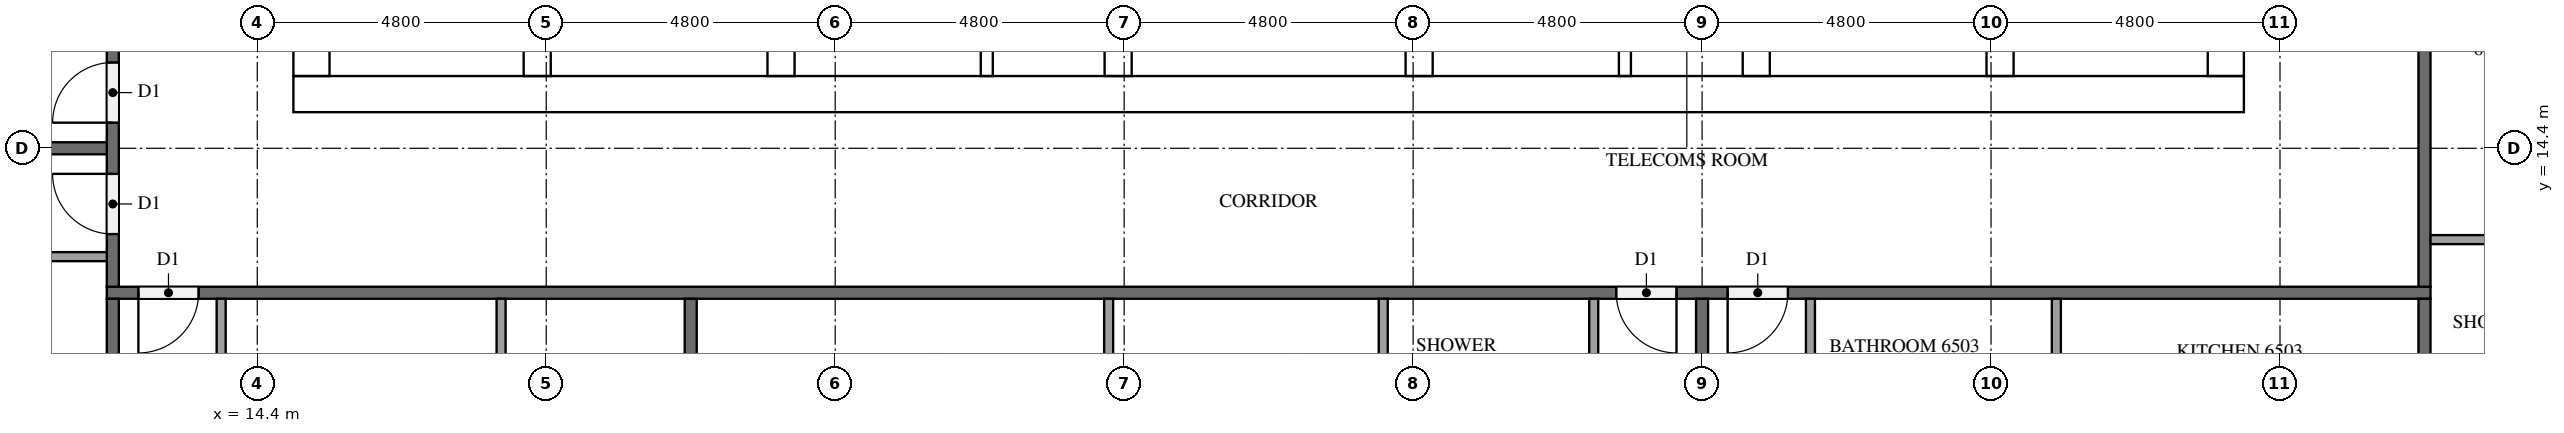
"""IFC4 building model, lengths in metres.
Left out: names, types, materials, properties, quantities, classifications, styles, units other than length and angle.
Written with IfcOpenShell. Run it as: python <this file> out.ifc"""

import sys

from ifc_helpers import new_model, si_unit, direction, frame, frame_2d, origin, place, context, subcontext, project, spatial, rectangle, extrude, element, fill, save


model = new_model("IFC4")
c1 = context("Model", 3, precision=1e-05, world=origin(), true_north=direction((0.0, 1.0)))
c2 = subcontext(c1, "Body", "Model", "MODEL_VIEW")
j1 = project(units=[si_unit("LENGTHUNIT", "METRE"), si_unit("PLANEANGLEUNIT", "RADIAN")], contexts=[c1])
p1 = place(None, origin())
s1 = spatial("IfcSite", under=j1, at=p1, CompositionType="ELEMENT")
p2 = place(p1, origin())
s2 = spatial("IfcBuilding", under=s1, at=p2, CompositionType="ELEMENT")
p3 = place(p2, frame((0.0, 0.0, 249.2)))
s3 = spatial("IfcBuildingStorey", under=s2, at=p3, CompositionType="ELEMENT", Elevation=249.2)
p4 = place(p3, frame((15.0, 15.3, 0.0), z_axis=(0.0, 0.0, 1.0), x_axis=(1.0, 0.0, 0.0)))
e1 = element("IfcWall", 1, at=p4, inside=s3, PredefinedType="SHEAR", context=c2, shape_type="SweptSolid", body=[
    extrude(rectangle(XDim=32.4, YDim=0.6, at=frame_2d((16.2, 0.0))), origin(), (0.0, 0.0, 1.0), 3.2),
])
p5 = place(p4, frame((15.3, 0.0, 0.0)))
e2 = element("IfcOpeningElement", 2, at=p5, cuts=e1, PredefinedType="OPENING", context=c2, shape_type="SweptSolid", body=[
    extrude(rectangle(XDim=1.8, YDim=2.1, at=frame_2d((0.9, 1.05))), frame((0.0, 0.31, 0.0), z_axis=(0.0, -1.0, 0.0), x_axis=(1.0, 0.0, 0.0)), (0.0, 0.0, 1.0), 0.62),
])
p6 = place(p3, frame((15.3, 15.6, 0.0), z_axis=(0.0, 0.0, 1.0), x_axis=(0.0, 1.0, 0.0)))
e3 = element("IfcWall", 3, at=p6, inside=s3, PredefinedType="SHEAR", context=c2, shape_type="SweptSolid", body=[
    extrude(rectangle(XDim=21.6, YDim=0.6, at=frame_2d((10.8, 0.0))), origin(), (0.0, 0.0, 1.0), 3.2),
])
p7 = place(p6, frame((5.16, 0.0, 0.0)))
e4 = element("IfcOpeningElement", 4, at=p7, cuts=e3, PredefinedType="OPENING", context=c2, shape_type="SweptSolid", body=[
    extrude(rectangle(XDim=1.2, YDim=2.1, at=frame_2d((0.6, 1.05))), frame((0.0, 0.31, 0.0), z_axis=(0.0, -1.0, 0.0), x_axis=(1.0, 0.0, 0.0)), (0.0, 0.0, 1.0), 0.62),
])
p8 = place(p3, frame((47.1, 15.6, 0.0), z_axis=(0.0, 0.0, 1.0), x_axis=(0.0, 1.0, 0.0)))
e5 = element("IfcWall", 5, at=p8, inside=s3, PredefinedType="SHEAR", context=c2, shape_type="SweptSolid", body=[
    extrude(rectangle(XDim=21.6, YDim=0.6, at=frame_2d((10.8, 0.0))), origin(), (0.0, 0.0, 1.0), 3.2),
])
p9 = place(p8, frame((10.5, 0.0, 0.0)))
e6 = element("IfcOpeningElement", 6, at=p9, cuts=e5, PredefinedType="OPENING", context=c2, shape_type="SweptSolid", body=[
    extrude(rectangle(XDim=1.2, YDim=2.1, at=frame_2d((0.6, 1.05))), frame((0.0, 0.31, 0.0), z_axis=(0.0, -1.0, 0.0), x_axis=(1.0, 0.0, 0.0)), (0.0, 0.0, 1.0), 0.62),
])
p10 = place(p3, frame((19.05, 15.6, 0.0), z_axis=(0.0, 0.0, 1.0), x_axis=(0.0, 1.0, 0.0)))
e7 = element("IfcWall", 7, at=p10, inside=s3, PredefinedType="SHEAR", context=c2, shape_type="SweptSolid", body=[
    extrude(rectangle(XDim=15.425, YDim=0.45, at=frame_2d((7.712, 0.0))), origin(), (0.0, 0.0, 1.0), 3.2),
])
p11 = place(p10, frame((9.85, 0.0, 0.0)))
e8 = element("IfcOpeningElement", 8, at=p11, cuts=e7, PredefinedType="OPENING", context=c2, shape_type="SweptSolid", body=[
    extrude(rectangle(XDim=1.1, YDim=2.1, at=frame_2d((0.55, 1.05))), frame((0.0, 0.235, 0.0), z_axis=(0.0, -1.0, 0.0), x_axis=(1.0, 0.0, 0.0)), (0.0, 0.0, 1.0), 0.47),
])
p12 = place(p10, frame((13.35, 0.0, 0.0)))
e9 = element("IfcOpeningElement", 9, at=p12, cuts=e7, PredefinedType="OPENING", context=c2, shape_type="SweptSolid", body=[
    extrude(rectangle(XDim=1.1, YDim=2.1, at=frame_2d((0.55, 1.05))), frame((0.0, 0.235, 0.0), z_axis=(0.0, -1.0, 0.0), x_axis=(1.0, 0.0, 0.0)), (0.0, 0.0, 1.0), 0.47),
])
p13 = place(p10, frame((0.6, 0.0, 0.0)))
e10 = element("IfcOpeningElement", 10, at=p13, cuts=e7, PredefinedType="OPENING", context=c2, shape_type="SweptSolid", body=[
    extrude(rectangle(XDim=1.2, YDim=2.1, at=frame_2d((0.6, 1.05))), frame((0.0, 0.235, 0.0), z_axis=(0.0, -1.0, 0.0), x_axis=(1.0, 0.0, 0.0)), (0.0, 0.0, 1.0), 0.47),
])
p14 = place(p3, frame((23.1, 15.6, 0.0), z_axis=(0.0, 0.0, 1.0), x_axis=(0.0, 1.0, 0.0)))
e11 = element("IfcWall", 11, at=p14, inside=s3, PredefinedType="SHEAR", context=c2, shape_type="SweptSolid", body=[
    extrude(rectangle(XDim=21.6, YDim=0.45, at=frame_2d((10.8, 0.0))), origin(), (0.0, 0.0, 1.0), 3.2),
])
p15 = place(p3, frame((39.3, 15.6, 0.0), z_axis=(0.0, 0.0, 1.0), x_axis=(0.0, 1.0, 0.0)))
e12 = element("IfcWall", 12, at=p15, inside=s3, PredefinedType="SHEAR", context=c2, shape_type="SweptSolid", body=[
    extrude(rectangle(XDim=8.65, YDim=0.45, at=frame_2d((4.325, 0.0))), origin(), (0.0, 0.0, 1.0), 3.2),
])
p16 = place(p3, frame((43.35, 15.6, 0.0), z_axis=(0.0, 0.0, 1.0), x_axis=(0.0, 1.0, 0.0)))
e13 = element("IfcWall", 13, at=p16, inside=s3, PredefinedType="SHEAR", context=c2, shape_type="SweptSolid", body=[
    extrude(rectangle(XDim=8.65, YDim=0.45, at=frame_2d((4.325, 0.0))), origin(), (0.0, 0.0, 1.0), 3.2),
])
p17 = place(p16, frame((0.6, 0.0, 0.0)))
e14 = element("IfcOpeningElement", 14, at=p17, cuts=e13, PredefinedType="OPENING", context=c2, shape_type="SweptSolid", body=[
    extrude(rectangle(XDim=1.2, YDim=2.1, at=frame_2d((0.6, 1.05))), frame((0.0, 0.235, 0.0), z_axis=(0.0, -1.0, 0.0), x_axis=(1.0, 0.0, 0.0)), (0.0, 0.0, 1.0), 0.47),
])
for number, where, z_axis, x_axis in (
    (15, (28.7, 15.6, 0.0), (0.0, 0.0, 1.0), (0.0, 1.0, 0.0)),
    (16, (33.7, 15.6, 0.0), (0.0, 0.0, 1.0), (0.0, 1.0, 0.0)),
):
    element("IfcWall", number, at=place(p3, frame(where, z_axis=z_axis, x_axis=x_axis)), inside=s3, PredefinedType="SHEAR", context=c2, shape_type="SweptSolid", body=[
        extrude(rectangle(XDim=2.925, YDim=0.45, at=frame_2d((1.462, 0.0))), origin(), (0.0, 0.0, 1.0), 3.2),
    ])
for number, where, z_axis, x_axis in (
    (17, (26.518, 15.6, 0.0), (0.0, 0.0, 1.0), (0.0, 1.0, 0.0)),
    (18, (37.118, 15.6, 0.0), (0.0, 0.0, 1.0), (0.0, 1.0, 0.0)),
):
    element("IfcWall", number, at=place(p3, frame(where, z_axis=z_axis, x_axis=x_axis)), inside=s3, PredefinedType="PARTITIONING", context=c2, shape_type="SweptSolid", body=[
        extrude(rectangle(XDim=2.925, YDim=0.2, at=frame_2d((1.462, 0.0))), origin(), (0.0, 0.0, 1.0), 3.2),
    ])
p18 = place(p3, frame((50.5, 12.0, 0.0), z_axis=(0.0, 0.0, 1.0), x_axis=(-1.0, 0.0, 0.0)))
e19 = element("IfcWall", 19, at=p18, inside=s3, PredefinedType="PARTITIONING", context=c2, shape_type="SweptSolid", body=[
    extrude(rectangle(XDim=38.6, YDim=0.2, at=frame_2d((19.3, 0.0))), origin(), (0.0, 0.0, 1.0), 3.2),
])
p19 = place(p18, frame((37.075, 0.0, 0.0)))
e20 = element("IfcOpeningElement", 20, at=p19, cuts=e19, PredefinedType="OPENING", context=c2, shape_type="SweptSolid", body=[
    extrude(rectangle(XDim=1.0, YDim=2.1, at=frame_2d((0.5, 1.05))), frame((0.0, 0.11, 0.0), z_axis=(0.0, -1.0, 0.0), x_axis=(1.0, 0.0, 0.0)), (0.0, 0.0, 1.0), 0.22),
])
p20 = place(p18, frame((12.525, 0.0, 0.0)))
e21 = element("IfcOpeningElement", 21, at=p20, cuts=e19, PredefinedType="OPENING", context=c2, shape_type="SweptSolid", body=[
    extrude(rectangle(XDim=1.0, YDim=2.1, at=frame_2d((0.5, 1.05))), frame((0.0, 0.11, 0.0), z_axis=(0.0, -1.0, 0.0), x_axis=(1.0, 0.0, 0.0)), (0.0, 0.0, 1.0), 0.22),
])
p21 = place(p18, frame((10.675, 0.0, 0.0)))
e22 = element("IfcOpeningElement", 22, at=p21, cuts=e19, PredefinedType="OPENING", context=c2, shape_type="SweptSolid", body=[
    extrude(rectangle(XDim=1.0, YDim=2.1, at=frame_2d((0.5, 1.05))), frame((0.0, 0.11, 0.0), z_axis=(0.0, -1.0, 0.0), x_axis=(1.0, 0.0, 0.0)), (0.0, 0.0, 1.0), 0.22),
])
p22 = place(p3, frame((50.4, 40.7, 0.0), z_axis=(0.0, 0.0, 1.0), x_axis=(0.0, -1.0, 0.0)))
e23 = element("IfcWall", 23, at=p22, inside=s3, PredefinedType="PARTITIONING", context=c2, shape_type="SweptSolid", body=[
    extrude(rectangle(XDim=28.6, YDim=0.2, at=frame_2d((14.3, 0.0))), origin(), (0.0, 0.0, 1.0), 3.2),
])
p23 = place(p22, frame((19.525, 0.0, 0.0)))
e24 = element("IfcOpeningElement", 24, at=p23, cuts=e23, PredefinedType="OPENING", context=c2, shape_type="SweptSolid", body=[
    extrude(rectangle(XDim=1.0, YDim=2.1, at=frame_2d((0.5, 1.05))), frame((0.0, 0.11, 0.0), z_axis=(0.0, -1.0, 0.0), x_axis=(1.0, 0.0, 0.0)), (0.0, 0.0, 1.0), 0.22),
])
p24 = place(p22, frame((17.675, 0.0, 0.0)))
e25 = element("IfcOpeningElement", 25, at=p24, cuts=e23, PredefinedType="OPENING", context=c2, shape_type="SweptSolid", body=[
    extrude(rectangle(XDim=1.0, YDim=2.1, at=frame_2d((0.5, 1.05))), frame((0.0, 0.11, 0.0), z_axis=(0.0, -1.0, 0.0), x_axis=(1.0, 0.0, 0.0)), (0.0, 0.0, 1.0), 0.22),
])
p25 = place(p22, frame((0.325, 0.0, 0.0)))
e26 = element("IfcOpeningElement", 26, at=p25, cuts=e23, PredefinedType="OPENING", context=c2, shape_type="SweptSolid", body=[
    extrude(rectangle(XDim=1.0, YDim=2.1, at=frame_2d((0.5, 1.05))), frame((0.0, 0.11, 0.0), z_axis=(0.0, -1.0, 0.0), x_axis=(1.0, 0.0, 0.0)), (0.0, 0.0, 1.0), 0.22),
])
p26 = place(p3, frame((12.0, 12.1, 0.0), z_axis=(0.0, 0.0, 1.0), x_axis=(0.0, 1.0, 0.0)))
e27 = element("IfcWall", 27, at=p26, inside=s3, PredefinedType="PARTITIONING", context=c2, shape_type="SweptSolid", body=[
    extrude(rectangle(XDim=28.6, YDim=0.2, at=frame_2d((14.3, 0.0))), origin(), (0.0, 0.0, 1.0), 3.2),
])
p27 = place(p26, frame((26.725, 0.0, 0.0)))
e28 = element("IfcOpeningElement", 28, at=p27, cuts=e27, PredefinedType="OPENING", context=c2, shape_type="SweptSolid", body=[
    extrude(rectangle(XDim=1.0, YDim=2.1, at=frame_2d((0.5, 1.05))), frame((0.0, 0.11, 0.0), z_axis=(0.0, -1.0, 0.0), x_axis=(1.0, 0.0, 0.0)), (0.0, 0.0, 1.0), 0.22),
])
p28 = place(p26, frame((24.875, 0.0, 0.0)))
e29 = element("IfcOpeningElement", 29, at=p28, cuts=e27, PredefinedType="OPENING", context=c2, shape_type="SweptSolid", body=[
    extrude(rectangle(XDim=1.0, YDim=2.1, at=frame_2d((0.5, 1.05))), frame((0.0, 0.11, 0.0), z_axis=(0.0, -1.0, 0.0), x_axis=(1.0, 0.0, 0.0)), (0.0, 0.0, 1.0), 0.22),
])
p29 = place(p26, frame((17.675, 0.0, 0.0)))
e30 = element("IfcOpeningElement", 30, at=p29, cuts=e27, PredefinedType="OPENING", context=c2, shape_type="SweptSolid", body=[
    extrude(rectangle(XDim=1.0, YDim=2.1, at=frame_2d((0.5, 1.05))), frame((0.0, 0.11, 0.0), z_axis=(0.0, -1.0, 0.0), x_axis=(1.0, 0.0, 0.0)), (0.0, 0.0, 1.0), 0.22),
])
p30 = place(p26, frame((2.725, 0.0, 0.0)))
e31 = element("IfcOpeningElement", 31, at=p30, cuts=e27, PredefinedType="OPENING", context=c2, shape_type="SweptSolid", body=[
    extrude(rectangle(XDim=1.0, YDim=2.1, at=frame_2d((0.5, 1.05))), frame((0.0, 0.11, 0.0), z_axis=(0.0, -1.0, 0.0), x_axis=(1.0, 0.0, 0.0)), (0.0, 0.0, 1.0), 0.22),
])
p31 = place(p26, frame((0.875, 0.0, 0.0)))
e32 = element("IfcOpeningElement", 32, at=p31, cuts=e27, PredefinedType="OPENING", context=c2, shape_type="SweptSolid", body=[
    extrude(rectangle(XDim=1.0, YDim=2.1, at=frame_2d((0.5, 1.05))), frame((0.0, 0.11, 0.0), z_axis=(0.0, -1.0, 0.0), x_axis=(1.0, 0.0, 0.0)), (0.0, 0.0, 1.0), 0.22),
])
for number, where, z_axis, x_axis in (
    (33, (21.6, 11.9, 0.0), (0.0, 0.0, 1.0), (0.0, -1.0, 0.0)),
    (34, (12.0, 4.9, 0.0), (0.0, 0.0, 1.0), (0.0, 1.0, 0.0)),
    (35, (38.4, 11.9, 0.0), (0.0, 0.0, 1.0), (0.0, -1.0, 0.0)),
    (36, (50.4, 11.9, 0.0), (0.0, 0.0, 1.0), (0.0, -1.0, 0.0)),
):
    element("IfcWall", number, at=place(p3, frame(where, z_axis=z_axis, x_axis=x_axis)), inside=s3, PredefinedType="PARTITIONING", context=c2, shape_type="SweptSolid", body=[
        extrude(rectangle(XDim=7.0, YDim=0.2, at=frame_2d((3.5, 0.0))), origin(), (0.0, 0.0, 1.0), 3.2),
    ])
p32 = place(p3, frame((0.1, 14.4, 0.0), z_axis=(0.0, 0.0, 1.0), x_axis=(1.0, 0.0, 0.0)))
e37 = element("IfcWall", 37, at=p32, inside=s3, PredefinedType="PARTITIONING", context=c2, shape_type="SweptSolid", body=[
    extrude(rectangle(XDim=11.8, YDim=0.2, at=frame_2d((5.9, 0.0))), origin(), (0.0, 0.0, 1.0), 3.2),
])
p33 = place(p3, frame((18.45, 11.9, 0.0), z_axis=(0.0, 0.0, 1.0), x_axis=(0.0, -1.0, 0.0)))
e38 = element("IfcWall", 38, at=p33, inside=s3, PredefinedType="PARTITIONING", context=c2, shape_type="SweptSolid", body=[
    extrude(rectangle(XDim=2.375, YDim=0.15, at=frame_2d((1.188, 0.0))), origin(), (0.0, 0.0, 1.0), 3.2),
])
p34 = place(p3, frame((13.8, 11.9, 0.0), z_axis=(0.0, 0.0, 1.0), x_axis=(0.0, -1.0, 0.0)))
e39 = element("IfcWall", 39, at=p34, inside=s3, PredefinedType="PARTITIONING", context=c2, shape_type="SweptSolid", body=[
    extrude(rectangle(XDim=2.525, YDim=0.15, at=frame_2d((1.262, 0.0))), origin(), (0.0, 0.0, 1.0), 3.2),
])
for number, where, z_axis, x_axis in (
    (40, (33.104, 11.9, 0.0), (0.0, 0.0, 1.0), (0.0, -1.0, 0.0)),
    (41, (28.542, 11.9, 0.0), (0.0, 0.0, 1.0), (0.0, -1.0, 0.0)),
):
    element("IfcWall", number, at=place(p3, frame(where, z_axis=z_axis, x_axis=x_axis)), inside=s3, PredefinedType="PARTITIONING", context=c2, shape_type="SweptSolid", body=[
        extrude(rectangle(XDim=2.075, YDim=0.15, at=frame_2d((1.038, 0.0))), origin(), (0.0, 0.0, 1.0), 3.2),
    ])
p35 = place(p3, frame((36.6, 11.9, 0.0), z_axis=(0.0, 0.0, 1.0), x_axis=(0.0, -1.0, 0.0)))
e42 = element("IfcWall", 42, at=p35, inside=s3, PredefinedType="PARTITIONING", context=c2, shape_type="SweptSolid", body=[
    extrude(rectangle(XDim=2.225, YDim=0.15, at=frame_2d((1.112, 0.0))), origin(), (0.0, 0.0, 1.0), 3.2),
])
p36 = place(p3, frame((44.285, 11.9, 0.0), z_axis=(0.0, 0.0, 1.0), x_axis=(0.0, -1.0, 0.0)))
e43 = element("IfcWall", 43, at=p36, inside=s3, PredefinedType="PARTITIONING", context=c2, shape_type="SweptSolid", body=[
    extrude(rectangle(XDim=1.775, YDim=0.15, at=frame_2d((0.887, 0.0))), origin(), (0.0, 0.0, 1.0), 3.2),
])
p37 = place(p3, frame((40.2, 11.9, 0.0), z_axis=(0.0, 0.0, 1.0), x_axis=(0.0, -1.0, 0.0)))
e44 = element("IfcWall", 44, at=p37, inside=s3, PredefinedType="PARTITIONING", context=c2, shape_type="SweptSolid", body=[
    extrude(rectangle(XDim=1.925, YDim=0.15, at=frame_2d((0.962, 0.0))), origin(), (0.0, 0.0, 1.0), 3.2),
])
p38 = place(p3, frame((50.5, 12.883, 0.0), z_axis=(0.0, 0.0, 1.0), x_axis=(1.0, 0.0, 0.0)))
e45 = element("IfcWall", 45, at=p38, inside=s3, PredefinedType="PARTITIONING", context=c2, shape_type="SweptSolid", body=[
    extrude(rectangle(XDim=2.075, YDim=0.15, at=frame_2d((1.038, 0.0))), origin(), (0.0, 0.0, 1.0), 3.2),
])
p39 = place(p3, frame((11.9, 12.6, 0.0), z_axis=(0.0, 0.0, 1.0), x_axis=(-1.0, 0.0, 0.0)))
e46 = element("IfcWall", 46, at=p39, inside=s3, PredefinedType="PARTITIONING", context=c2, shape_type="SweptSolid", body=[
    extrude(rectangle(XDim=4.025, YDim=0.15, at=frame_2d((2.012, 0.0))), origin(), (0.0, 0.0, 1.0), 3.2),
])
p40 = place(p5, frame((1.8, 0.0, 0.0), z_axis=(0.0, 0.0, 1.0), x_axis=(-1.0, 0.0, 0.0)))
e47 = element("IfcDoor", 47, at=p40, inside=s3, OperationType="DOUBLE_DOOR_SINGLE_SWING", PredefinedType="DOOR", context=c2, shape_type="SweptSolid", body=[
    extrude(rectangle(XDim=1.8, YDim=2.1, at=frame_2d((0.9, 1.05))), frame((0.0, 0.025, 0.0), z_axis=(0.0, -1.0, 0.0), x_axis=(1.0, 0.0, 0.0)), (0.0, 0.0, 1.0), 0.05),
])
fill(e2, e47)
p41 = place(p19, origin())
e48 = element("IfcDoor", 48, at=p41, inside=s3, OperationType="SINGLE_SWING_RIGHT", PredefinedType="DOOR", context=c2, shape_type="SweptSolid", body=[
    extrude(rectangle(XDim=1.0, YDim=2.1, at=frame_2d((0.5, 1.05))), frame((0.0, 0.025, 0.0), z_axis=(0.0, -1.0, 0.0), x_axis=(1.0, 0.0, 0.0)), (0.0, 0.0, 1.0), 0.05),
])
fill(e20, e48)
p42 = place(p20, origin())
e49 = element("IfcDoor", 49, at=p42, inside=s3, OperationType="SINGLE_SWING_LEFT", PredefinedType="DOOR", context=c2, shape_type="SweptSolid", body=[
    extrude(rectangle(XDim=1.0, YDim=2.1, at=frame_2d((0.5, 1.05))), frame((0.0, 0.025, 0.0), z_axis=(0.0, -1.0, 0.0), x_axis=(1.0, 0.0, 0.0)), (0.0, 0.0, 1.0), 0.05),
])
fill(e21, e49)
p43 = place(p21, origin())
e50 = element("IfcDoor", 50, at=p43, inside=s3, OperationType="SINGLE_SWING_RIGHT", PredefinedType="DOOR", context=c2, shape_type="SweptSolid", body=[
    extrude(rectangle(XDim=1.0, YDim=2.1, at=frame_2d((0.5, 1.05))), frame((0.0, 0.025, 0.0), z_axis=(0.0, -1.0, 0.0), x_axis=(1.0, 0.0, 0.0)), (0.0, 0.0, 1.0), 0.05),
])
fill(e22, e50)
p44 = place(p30, origin())
e51 = element("IfcDoor", 51, at=p44, inside=s3, OperationType="SINGLE_SWING_LEFT", PredefinedType="DOOR", context=c2, shape_type="SweptSolid", body=[
    extrude(rectangle(XDim=1.0, YDim=2.1, at=frame_2d((0.5, 1.05))), frame((0.0, 0.025, 0.0), z_axis=(0.0, -1.0, 0.0), x_axis=(1.0, 0.0, 0.0)), (0.0, 0.0, 1.0), 0.05),
])
fill(e31, e51)
p45 = place(p31, origin())
e52 = element("IfcDoor", 52, at=p45, inside=s3, OperationType="SINGLE_SWING_RIGHT", PredefinedType="DOOR", context=c2, shape_type="SweptSolid", body=[
    extrude(rectangle(XDim=1.0, YDim=2.1, at=frame_2d((0.5, 1.05))), frame((0.0, 0.025, 0.0), z_axis=(0.0, -1.0, 0.0), x_axis=(1.0, 0.0, 0.0)), (0.0, 0.0, 1.0), 0.05),
])
fill(e32, e52)
save(model, sys.argv[1])
